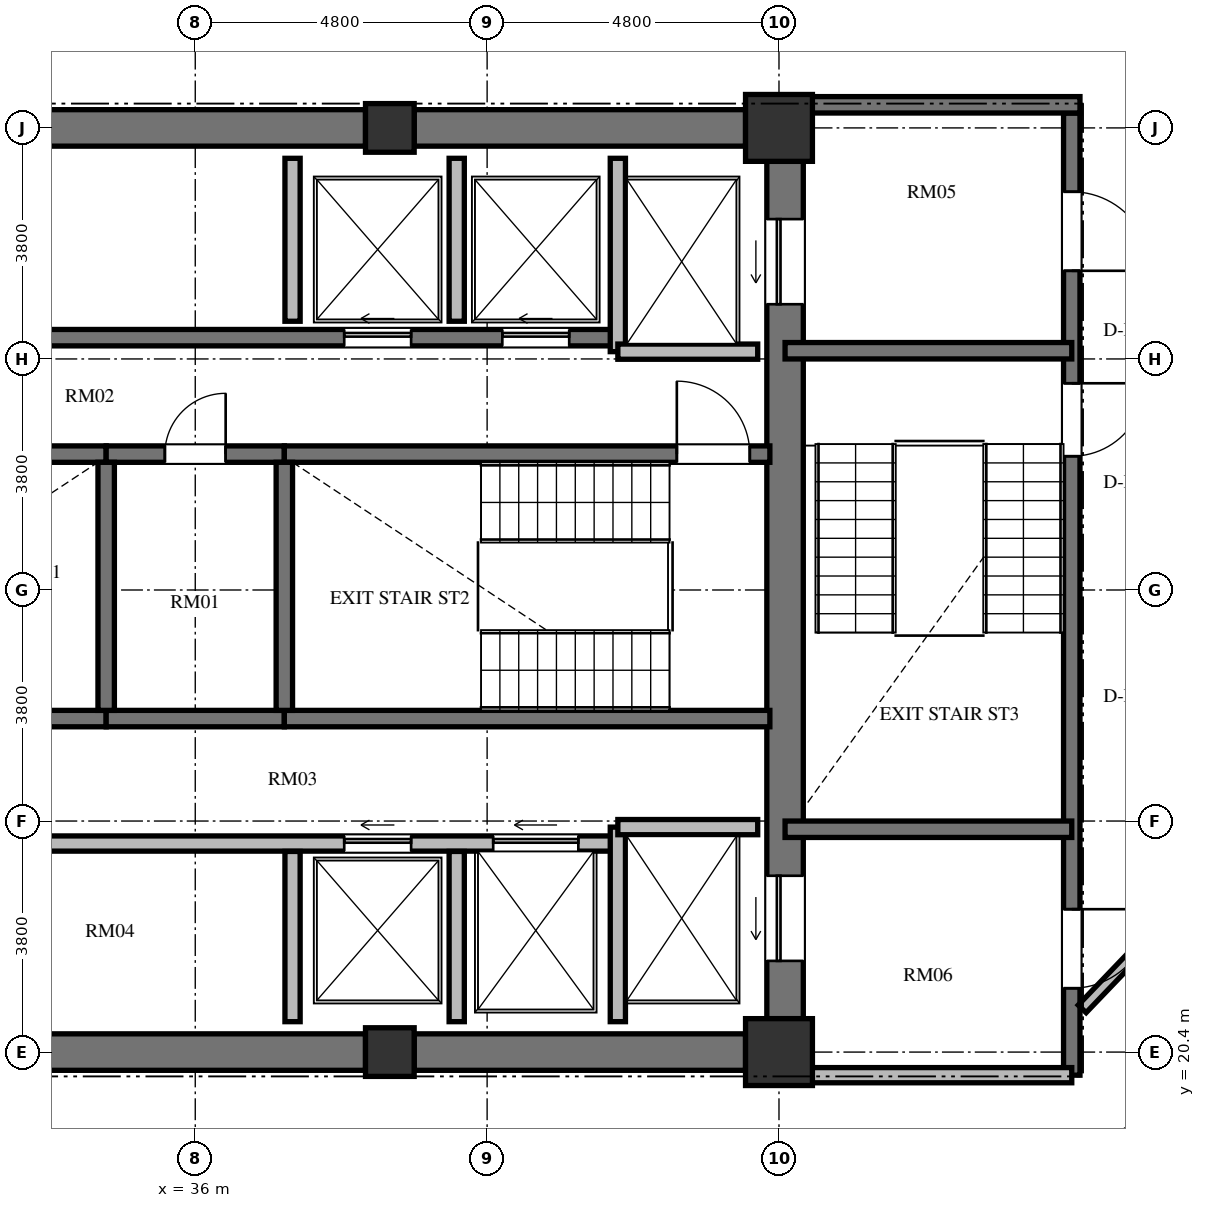
"""IFC4 building model, lengths in metres.
Left out: names, types, materials, properties, quantities, classifications, styles, units other than length and angle.
Written with IfcOpenShell. Run it as: python <this file> out.ifc"""

import sys

from ifc_helpers import new_model, si_unit, direction, frame, frame_2d, origin, origin_2d, place, context, subcontext, project, spatial, rectangle, extrude, element, fill, save


model = new_model("IFC4")
c1 = context("Model", 3, precision=1e-05, world=origin(), true_north=direction((0.0, 1.0)))
c2 = subcontext(c1, "Body", "Model", "MODEL_VIEW")
j1 = project(units=[si_unit("LENGTHUNIT", "METRE"), si_unit("PLANEANGLEUNIT", "RADIAN")], contexts=[c1])
p1 = place(None, origin())
s1 = spatial("IfcSite", under=j1, at=p1, CompositionType="ELEMENT")
p2 = place(p1, origin())
s2 = spatial("IfcBuilding", under=s1, at=p2, CompositionType="ELEMENT")
p3 = place(p2, frame((0.0, 0.0, 216.72)))
s3 = spatial("IfcBuildingStorey", under=s2, at=p3, CompositionType="ELEMENT", Elevation=216.72)
p4 = place(p3, frame((39.2, 20.4, 0.0), z_axis=(0.0, 0.0, 1.0), x_axis=(1.0, 0.0, 0.0)))
e1 = element("IfcColumn", 1, at=p4, inside=s3, PredefinedType="COLUMN", context=c2, shape_type="SweptSolid", body=[
    extrude(rectangle(XDim=0.8, YDim=0.8, at=origin_2d()), origin(), (0.0, 0.0, 1.0), 3.648),
])
for number, where, z_axis, x_axis in (
    (2, (45.6, 20.4, 0.0), (0.0, 0.0, 1.0), (1.0, 0.0, 0.0)),
    (3, (45.6, 35.6, 0.0), (0.0, 0.0, 1.0), (1.0, 0.0, 0.0)),
):
    element("IfcColumn", number, at=place(p3, frame(where, z_axis=z_axis, x_axis=x_axis)), inside=s3, PredefinedType="COLUMN", context=c2, shape_type="SweptSolid", body=[
        extrude(rectangle(XDim=1.1, YDim=1.1, at=origin_2d()), origin(), (0.0, 0.0, 1.0), 3.648),
    ])
p5 = place(p3, frame((39.2, 35.6, 0.0), z_axis=(0.0, 0.0, 1.0), x_axis=(1.0, 0.0, 0.0)))
e4 = element("IfcColumn", 4, at=p5, inside=s3, PredefinedType="COLUMN", context=c2, shape_type="SweptSolid", body=[
    extrude(rectangle(XDim=0.8, YDim=0.8, at=origin_2d()), origin(), (0.0, 0.0, 1.0), 3.648),
])
p6 = place(p3, frame((45.7, 20.95, 0.0), z_axis=(0.0, 0.0, 1.0), x_axis=(0.0, 1.0, 0.0)))
e5 = element("IfcWall", 5, at=p6, inside=s3, PredefinedType="SHEAR", context=c2, shape_type="SweptSolid", body=[
    extrude(rectangle(XDim=14.1, YDim=0.6, at=frame_2d((7.05, 0.0))), origin(), (0.0, 0.0, 1.0), 3.648),
])
p7 = place(p6, frame((11.75, 0.0, 0.0)))
e6 = element("IfcOpeningElement", 6, at=p7, cuts=e5, PredefinedType="OPENING", context=c2, shape_type="SweptSolid", body=[
    extrude(rectangle(XDim=1.4, YDim=2.3, at=frame_2d((0.7, 1.15))), frame((0.0, 0.31, 0.0), z_axis=(0.0, -1.0, 0.0), x_axis=(1.0, 0.0, 0.0)), (0.0, 0.0, 1.0), 0.62),
])
p8 = place(p6, frame((0.95, 0.0, 0.0)))
e7 = element("IfcOpeningElement", 7, at=p8, cuts=e5, PredefinedType="OPENING", context=c2, shape_type="SweptSolid", body=[
    extrude(rectangle(XDim=1.4, YDim=2.3, at=frame_2d((0.7, 1.15))), frame((0.0, 0.31, 0.0), z_axis=(0.0, -1.0, 0.0), x_axis=(1.0, 0.0, 0.0)), (0.0, 0.0, 1.0), 0.62),
])
for number, where, z_axis, x_axis in (
    (8, (33.2, 20.4, 0.0), (0.0, 0.0, 1.0), (1.0, 0.0, 0.0)),
    (9, (33.2, 35.6, 0.0), (0.0, 0.0, 1.0), (1.0, 0.0, 0.0)),
):
    element("IfcWall", number, at=place(p3, frame(where, z_axis=z_axis, x_axis=x_axis)), inside=s3, PredefinedType="SHEAR", context=c2, shape_type="SweptSolid", body=[
        extrude(rectangle(XDim=5.6, YDim=0.6, at=frame_2d((2.8, 0.0))), origin(), (0.0, 0.0, 1.0), 3.648),
    ])
for number, where, z_axis, x_axis in (
    (10, (39.6, 20.4, 0.0), (0.0, 0.0, 1.0), (1.0, 0.0, 0.0)),
    (11, (39.6, 35.6, 0.0), (0.0, 0.0, 1.0), (1.0, 0.0, 0.0)),
):
    element("IfcWall", number, at=place(p3, frame(where, z_axis=z_axis, x_axis=x_axis)), inside=s3, PredefinedType="SHEAR", context=c2, shape_type="SweptSolid", body=[
        extrude(rectangle(XDim=5.45, YDim=0.6, at=frame_2d((2.725, 0.0))), origin(), (0.0, 0.0, 1.0), 3.648),
    ])
p9 = place(p3, frame((26.55, 30.235, 0.0), z_axis=(0.0, 0.0, 1.0), x_axis=(1.0, 0.0, 0.0)))
e12 = element("IfcWall", 12, at=p9, inside=s3, PredefinedType="SHEAR", context=c2, shape_type="SweptSolid", body=[
    extrude(rectangle(XDim=7.985, YDim=0.27, at=frame_2d((3.992, 0.0))), origin(), (0.0, 0.0, 1.0), 3.648),
])
p10 = place(p3, frame((34.535, 30.235, 0.0), z_axis=(0.0, 0.0, 1.0), x_axis=(1.0, 0.0, 0.0)))
e13 = element("IfcWall", 13, at=p10, inside=s3, PredefinedType="SHEAR", context=c2, shape_type="SweptSolid", body=[
    extrude(rectangle(XDim=2.93, YDim=0.27, at=frame_2d((1.465, 0.0))), origin(), (0.0, 0.0, 1.0), 3.648),
])
p11 = place(p10, frame((0.965, 0.0, 0.0)))
e14 = element("IfcOpeningElement", 14, at=p11, cuts=e13, PredefinedType="OPENING", context=c2, shape_type="SweptSolid", body=[
    extrude(rectangle(XDim=1.0, YDim=2.1, at=frame_2d((0.5, 1.05))), frame((0.0, 0.145, 0.0), z_axis=(0.0, -1.0, 0.0), x_axis=(1.0, 0.0, 0.0)), (0.0, 0.0, 1.0), 0.29),
])
p12 = place(p3, frame((37.465, 30.235, 0.0), z_axis=(0.0, 0.0, 1.0), x_axis=(1.0, 0.0, 0.0)))
e15 = element("IfcWall", 15, at=p12, inside=s3, PredefinedType="SHEAR", context=c2, shape_type="SweptSolid", body=[
    extrude(rectangle(XDim=7.985, YDim=0.27, at=frame_2d((3.992, 0.0))), origin(), (0.0, 0.0, 1.0), 3.648),
])
p13 = place(p12, frame((6.455, 0.0, 0.0)))
e16 = element("IfcOpeningElement", 16, at=p13, cuts=e15, PredefinedType="OPENING", context=c2, shape_type="SweptSolid", body=[
    extrude(rectangle(XDim=1.2, YDim=2.15, at=frame_2d((0.6, 1.075))), frame((0.0, 0.145, 0.0), z_axis=(0.0, -1.0, 0.0), x_axis=(1.0, 0.0, 0.0)), (0.0, 0.0, 1.0), 0.29),
])
p14 = place(p3, frame((26.55, 25.885, 0.0), z_axis=(0.0, 0.0, 1.0), x_axis=(1.0, 0.0, 0.0)))
e17 = element("IfcWall", 17, at=p14, inside=s3, PredefinedType="SHEAR", context=c2, shape_type="SweptSolid", body=[
    extrude(rectangle(XDim=7.985, YDim=0.27, at=frame_2d((3.992, 0.0))), origin(), (0.0, 0.0, 1.0), 3.648),
])
p15 = place(p3, frame((34.535, 25.885, 0.0), z_axis=(0.0, 0.0, 1.0), x_axis=(1.0, 0.0, 0.0)))
e18 = element("IfcWall", 18, at=p15, inside=s3, PredefinedType="SHEAR", context=c2, shape_type="SweptSolid", body=[
    extrude(rectangle(XDim=2.93, YDim=0.27, at=frame_2d((1.465, 0.0))), origin(), (0.0, 0.0, 1.0), 3.648),
])
p16 = place(p3, frame((37.465, 25.885, 0.0), z_axis=(0.0, 0.0, 1.0), x_axis=(1.0, 0.0, 0.0)))
e19 = element("IfcWall", 19, at=p16, inside=s3, PredefinedType="SHEAR", context=c2, shape_type="SweptSolid", body=[
    extrude(rectangle(XDim=7.985, YDim=0.27, at=frame_2d((3.992, 0.0))), origin(), (0.0, 0.0, 1.0), 3.648),
])
for number, where, z_axis, x_axis in (
    (20, (34.535, 26.02, 0.0), (0.0, 0.0, 1.0), (0.0, 1.0, 0.0)),
    (21, (37.465, 26.02, 0.0), (0.0, 0.0, 1.0), (0.0, 1.0, 0.0)),
):
    element("IfcWall", number, at=place(p3, frame(where, z_axis=z_axis, x_axis=x_axis)), inside=s3, PredefinedType="SHEAR", context=c2, shape_type="SweptSolid", body=[
        extrude(rectangle(XDim=4.08, YDim=0.27, at=frame_2d((2.04, 0.0))), origin(), (0.0, 0.0, 1.0), 3.648),
    ])
p17 = place(p3, frame((26.55, 32.15, 0.0), z_axis=(0.0, 0.0, 1.0), x_axis=(1.0, 0.0, 0.0)))
e22 = element("IfcWall", 22, at=p17, inside=s3, PredefinedType="SHEAR", context=c2, shape_type="SweptSolid", body=[
    extrude(rectangle(XDim=16.4, YDim=0.27, at=frame_2d((8.2, 0.0))), origin(), (0.0, 0.0, 1.0), 3.648),
])
p18 = place(p17, frame((5.125, 0.0, 0.0)))
e23 = element("IfcOpeningElement", 23, at=p18, cuts=e22, PredefinedType="OPENING", context=c2, shape_type="SweptSolid", body=[
    extrude(rectangle(XDim=1.05, YDim=2.15, at=frame_2d((0.525, 1.075))), frame((0.0, 0.145, 0.0), z_axis=(0.0, -1.0, 0.0), x_axis=(1.0, 0.0, 0.0)), (0.0, 0.0, 1.0), 0.29),
])
p19 = place(p17, frame((11.9, 0.0, 0.0)))
e24 = element("IfcOpeningElement", 24, at=p19, cuts=e22, PredefinedType="OPENING", context=c2, shape_type="SweptSolid", body=[
    extrude(rectangle(XDim=1.1, YDim=2.2, at=frame_2d((0.55, 1.1))), frame((0.0, 0.145, 0.0), z_axis=(0.0, -1.0, 0.0), x_axis=(1.0, 0.0, 0.0)), (0.0, 0.0, 1.0), 0.29),
])
p20 = place(p17, frame((14.5, 0.0, 0.0)))
e25 = element("IfcOpeningElement", 25, at=p20, cuts=e22, PredefinedType="OPENING", context=c2, shape_type="SweptSolid", body=[
    extrude(rectangle(XDim=1.1, YDim=2.2, at=frame_2d((0.55, 1.1))), frame((0.0, 0.145, 0.0), z_axis=(0.0, -1.0, 0.0), x_axis=(1.0, 0.0, 0.0)), (0.0, 0.0, 1.0), 0.29),
])
p21 = place(p3, frame((26.75, 23.83, 0.0), z_axis=(0.0, 0.0, 1.0), x_axis=(1.0, 0.0, 0.0)))
e26 = element("IfcWall", 26, at=p21, inside=s3, PredefinedType="SOLIDWALL", context=c2, shape_type="SweptSolid", body=[
    extrude(rectangle(XDim=16.2, YDim=0.25, at=frame_2d((8.1, 0.0))), origin(), (0.0, 0.0, 1.0), 3.448),
])
p22 = place(p21, frame((4.75, 0.0, 0.0)))
e27 = element("IfcOpeningElement", 27, at=p22, cuts=e26, PredefinedType="OPENING", context=c2, shape_type="SweptSolid", body=[
    extrude(rectangle(XDim=1.4, YDim=2.2, at=frame_2d((0.7, 1.1))), frame((0.0, 0.135, 0.0), z_axis=(0.0, -1.0, 0.0), x_axis=(1.0, 0.0, 0.0)), (0.0, 0.0, 1.0), 0.27),
])
p23 = place(p21, frame((11.7, 0.0, 0.0)))
e28 = element("IfcOpeningElement", 28, at=p23, cuts=e26, PredefinedType="OPENING", context=c2, shape_type="SweptSolid", body=[
    extrude(rectangle(XDim=1.1, YDim=2.2, at=frame_2d((0.55, 1.1))), frame((0.0, 0.135, 0.0), z_axis=(0.0, -1.0, 0.0), x_axis=(1.0, 0.0, 0.0)), (0.0, 0.0, 1.0), 0.27),
])
p24 = place(p21, frame((14.15, 0.0, 0.0)))
e29 = element("IfcOpeningElement", 29, at=p24, cuts=e26, PredefinedType="OPENING", context=c2, shape_type="SweptSolid", body=[
    extrude(rectangle(XDim=1.4, YDim=2.3, at=frame_2d((0.7, 1.15))), frame((0.0, 0.135, 0.0), z_axis=(0.0, -1.0, 0.0), x_axis=(1.0, 0.0, 0.0)), (0.0, 0.0, 1.0), 0.27),
])
p25 = place(p3, frame((42.95, 31.92, 0.0), z_axis=(0.0, 0.0, 1.0), x_axis=(0.0, 1.0, 0.0)))
e30 = element("IfcWall", 30, at=p25, inside=s3, PredefinedType="SOLIDWALL", context=c2, shape_type="SweptSolid", body=[
    extrude(rectangle(XDim=3.18, YDim=0.25, at=frame_2d((1.59, 0.0))), origin(), (0.0, 0.0, 1.0), 3.448),
])
p26 = place(p3, frame((42.95, 31.92, 0.0), z_axis=(0.0, 0.0, 1.0), x_axis=(1.0, 0.0, 0.0)))
e31 = element("IfcWall", 31, at=p26, inside=s3, PredefinedType="SOLIDWALL", context=c2, shape_type="SweptSolid", body=[
    extrude(rectangle(XDim=2.3, YDim=0.25, at=frame_2d((1.15, 0.0))), origin(), (0.0, 0.0, 1.0), 3.448),
])
p27 = place(p3, frame((42.95, 20.9, 0.0), z_axis=(0.0, 0.0, 1.0), x_axis=(0.0, 1.0, 0.0)))
e32 = element("IfcWall", 32, at=p27, inside=s3, PredefinedType="SOLIDWALL", context=c2, shape_type="SweptSolid", body=[
    extrude(rectangle(XDim=3.2, YDim=0.25, at=frame_2d((1.6, 0.0))), origin(), (0.0, 0.0, 1.0), 3.448),
])
p28 = place(p3, frame((42.95, 24.1, 0.0), z_axis=(0.0, 0.0, 1.0), x_axis=(1.0, 0.0, 0.0)))
e33 = element("IfcWall", 33, at=p28, inside=s3, PredefinedType="SOLIDWALL", context=c2, shape_type="SweptSolid", body=[
    extrude(rectangle(XDim=2.3, YDim=0.25, at=frame_2d((1.15, 0.0))), origin(), (0.0, 0.0, 1.0), 3.448),
])
p29 = place(p3, frame((37.6, 32.42, 0.0), z_axis=(0.0, 0.0, 1.0), x_axis=(0.0, 1.0, 0.0)))
e34 = element("IfcWall", 34, at=p29, inside=s3, PredefinedType="SOLIDWALL", context=c2, shape_type="SweptSolid", body=[
    extrude(rectangle(XDim=2.68, YDim=0.25, at=frame_2d((1.34, 0.0))), origin(), (0.0, 0.0, 1.0), 3.448),
])
p30 = place(p3, frame((37.6, 20.9, 0.0), z_axis=(0.0, 0.0, 1.0), x_axis=(0.0, 1.0, 0.0)))
e35 = element("IfcWall", 35, at=p30, inside=s3, PredefinedType="SOLIDWALL", context=c2, shape_type="SweptSolid", body=[
    extrude(rectangle(XDim=2.8, YDim=0.25, at=frame_2d((1.4, 0.0))), origin(), (0.0, 0.0, 1.0), 3.448),
])
p31 = place(p3, frame((40.3, 32.42, 0.0), z_axis=(0.0, 0.0, 1.0), x_axis=(0.0, 1.0, 0.0)))
e36 = element("IfcWall", 36, at=p31, inside=s3, PredefinedType="SOLIDWALL", context=c2, shape_type="SweptSolid", body=[
    extrude(rectangle(XDim=2.68, YDim=0.25, at=frame_2d((1.34, 0.0))), origin(), (0.0, 0.0, 1.0), 3.448),
])
p32 = place(p3, frame((40.3, 20.9, 0.0), z_axis=(0.0, 0.0, 1.0), x_axis=(0.0, 1.0, 0.0)))
e37 = element("IfcWall", 37, at=p32, inside=s3, PredefinedType="SOLIDWALL", context=c2, shape_type="SweptSolid", body=[
    extrude(rectangle(XDim=2.8, YDim=0.25, at=frame_2d((1.4, 0.0))), origin(), (0.0, 0.0, 1.0), 3.448),
])
p33 = place(p3, frame((50.415, 35.845, 0.0), z_axis=(0.0, 0.0, 1.0), x_axis=(0.0, -1.0, 0.0)))
e38 = element("IfcWall", 38, at=p33, inside=s3, PredefinedType="SHEAR", context=c2, shape_type="SweptSolid", body=[
    extrude(rectangle(XDim=15.825, YDim=0.27, at=frame_2d((7.913, 0.0))), origin(), (0.0, 0.0, 1.0), 3.648),
])
p34 = place(p33, frame((4.445, 0.0, 0.0)))
e39 = element("IfcOpeningElement", 39, at=p34, cuts=e38, PredefinedType="OPENING", context=c2, shape_type="SweptSolid", body=[
    extrude(rectangle(XDim=1.2, YDim=2.15, at=frame_2d((0.6, 1.075))), frame((0.0, 0.145, 0.0), z_axis=(0.0, -1.0, 0.0), x_axis=(1.0, 0.0, 0.0)), (0.0, 0.0, 1.0), 0.29),
])
p35 = place(p33, frame((1.295, 0.0, 0.0)))
e40 = element("IfcOpeningElement", 40, at=p35, cuts=e38, PredefinedType="OPENING", context=c2, shape_type="SweptSolid", body=[
    extrude(rectangle(XDim=1.3, YDim=2.2, at=frame_2d((0.65, 1.1))), frame((0.0, 0.145, 0.0), z_axis=(0.0, -1.0, 0.0), x_axis=(1.0, 0.0, 0.0)), (0.0, 0.0, 1.0), 0.29),
])
p36 = place(p33, frame((13.095, 0.0, 0.0)))
e41 = element("IfcOpeningElement", 41, at=p36, cuts=e38, PredefinedType="OPENING", context=c2, shape_type="SweptSolid", body=[
    extrude(rectangle(XDim=1.3, YDim=2.2, at=frame_2d((0.65, 1.1))), frame((0.0, 0.145, 0.0), z_axis=(0.0, -1.0, 0.0), x_axis=(1.0, 0.0, 0.0)), (0.0, 0.0, 1.0), 0.29),
])
p37 = place(p3, frame((46.0, 35.98, 0.0), z_axis=(0.0, 0.0, 1.0), x_axis=(1.0, 0.0, 0.0)))
e42 = element("IfcWall", 42, at=p37, inside=s3, PredefinedType="SHEAR", context=c2, shape_type="SweptSolid", body=[
    extrude(rectangle(XDim=4.55, YDim=0.27, at=frame_2d((2.275, 0.0))), origin(), (0.0, 0.0, 1.0), 3.648),
])
for number, where, z_axis, x_axis in (
    (43, (45.7, 31.935, 0.0), (0.0, 0.0, 1.0), (1.0, 0.0, 0.0)),
    (44, (45.7, 24.065, 0.0), (0.0, 0.0, 1.0), (1.0, 0.0, 0.0)),
):
    element("IfcWall", number, at=place(p3, frame(where, z_axis=z_axis, x_axis=x_axis)), inside=s3, PredefinedType="SHEAR", context=c2, shape_type="SweptSolid", body=[
        extrude(rectangle(XDim=4.715, YDim=0.27, at=frame_2d((2.357, 0.0))), origin(), (0.0, 0.0, 1.0), 3.648),
    ])
p38 = place(p3, frame((45.7, 20.02, 0.0), z_axis=(0.0, 0.0, 1.0), x_axis=(1.0, 0.0, 0.0)))
e45 = element("IfcWall", 45, at=p38, inside=s3, PredefinedType="SOLIDWALL", context=c2, shape_type="SweptSolid", body=[
    extrude(rectangle(XDim=4.715, YDim=0.25, at=frame_2d((2.357, 0.0))), origin(), (0.0, 0.0, 1.0), 3.448),
])
p39 = place(p3, frame((53.078, 23.714, 0.0), z_axis=(0.0, 0.0, 1.0), x_axis=(-0.691353379446, -0.722516785085, 0.0)))
e46 = element("IfcWall", 46, at=p39, inside=s3, PredefinedType="PARTITIONING", context=c2, shape_type="SweptSolid", body=[
    extrude(rectangle(XDim=3.604, YDim=0.18, at=frame_2d((1.802, 0.0))), origin(), (0.0, 0.0, 1.0), 3.448),
])
p40 = place(p13, origin())
e47 = element("IfcDoor", 47, at=p40, inside=s3, OperationType="SINGLE_SWING_LEFT", PredefinedType="DOOR", context=c2, shape_type="SweptSolid", body=[
    extrude(rectangle(XDim=1.2, YDim=2.15, at=frame_2d((0.6, 1.075))), frame((0.0, 0.025, 0.0), z_axis=(0.0, -1.0, 0.0), x_axis=(1.0, 0.0, 0.0)), (0.0, 0.0, 1.0), 0.05),
])
fill(e16, e47)
p41 = place(p11, origin())
e48 = element("IfcDoor", 48, at=p41, inside=s3, OperationType="SINGLE_SWING_RIGHT", PredefinedType="DOOR", context=c2, shape_type="SweptSolid", body=[
    extrude(rectangle(XDim=1.0, YDim=2.1, at=frame_2d((0.5, 1.05))), frame((0.0, 0.025, 0.0), z_axis=(0.0, -1.0, 0.0), x_axis=(1.0, 0.0, 0.0)), (0.0, 0.0, 1.0), 0.05),
])
fill(e14, e48)
p42 = place(p19, origin())
e49 = element("IfcDoor", 49, at=p42, inside=s3, OperationType="SLIDING_TO_LEFT", PredefinedType="DOOR", context=c2, shape_type="SweptSolid", body=[
    extrude(rectangle(XDim=1.1, YDim=2.2, at=frame_2d((0.55, 1.1))), frame((0.0, 0.025, 0.0), z_axis=(0.0, -1.0, 0.0), x_axis=(1.0, 0.0, 0.0)), (0.0, 0.0, 1.0), 0.05),
])
fill(e24, e49)
p43 = place(p20, origin())
e50 = element("IfcDoor", 50, at=p43, inside=s3, OperationType="SLIDING_TO_LEFT", PredefinedType="DOOR", context=c2, shape_type="SweptSolid", body=[
    extrude(rectangle(XDim=1.1, YDim=2.2, at=frame_2d((0.55, 1.1))), frame((0.0, 0.025, 0.0), z_axis=(0.0, -1.0, 0.0), x_axis=(1.0, 0.0, 0.0)), (0.0, 0.0, 1.0), 0.05),
])
fill(e25, e50)
p44 = place(p23, origin())
e51 = element("IfcDoor", 51, at=p44, inside=s3, OperationType="SLIDING_TO_LEFT", PredefinedType="DOOR", context=c2, shape_type="SweptSolid", body=[
    extrude(rectangle(XDim=1.1, YDim=2.2, at=frame_2d((0.55, 1.1))), frame((0.0, 0.025, 0.0), z_axis=(0.0, -1.0, 0.0), x_axis=(1.0, 0.0, 0.0)), (0.0, 0.0, 1.0), 0.05),
])
fill(e28, e51)
p45 = place(p7, origin())
e52 = element("IfcDoor", 52, at=p45, inside=s3, OperationType="SLIDING_TO_LEFT", PredefinedType="DOOR", context=c2, shape_type="SweptSolid", body=[
    extrude(rectangle(XDim=1.4, YDim=2.3, at=frame_2d((0.7, 1.15))), frame((0.0, 0.025, 0.0), z_axis=(0.0, -1.0, 0.0), x_axis=(1.0, 0.0, 0.0)), (0.0, 0.0, 1.0), 0.05),
])
fill(e6, e52)
p46 = place(p8, origin())
e53 = element("IfcDoor", 53, at=p46, inside=s3, OperationType="SLIDING_TO_LEFT", PredefinedType="DOOR", context=c2, shape_type="SweptSolid", body=[
    extrude(rectangle(XDim=1.4, YDim=2.3, at=frame_2d((0.7, 1.15))), frame((0.0, 0.025, 0.0), z_axis=(0.0, -1.0, 0.0), x_axis=(1.0, 0.0, 0.0)), (0.0, 0.0, 1.0), 0.05),
])
fill(e7, e53)
p47 = place(p24, origin())
e54 = element("IfcDoor", 54, at=p47, inside=s3, OperationType="SLIDING_TO_LEFT", PredefinedType="DOOR", context=c2, shape_type="SweptSolid", body=[
    extrude(rectangle(XDim=1.4, YDim=2.3, at=frame_2d((0.7, 1.15))), frame((0.0, 0.025, 0.0), z_axis=(0.0, -1.0, 0.0), x_axis=(1.0, 0.0, 0.0)), (0.0, 0.0, 1.0), 0.05),
])
fill(e29, e54)
p48 = place(p34, origin())
e55 = element("IfcDoor", 55, at=p48, inside=s3, OperationType="SINGLE_SWING_LEFT", PredefinedType="DOOR", context=c2, shape_type="SweptSolid", body=[
    extrude(rectangle(XDim=1.2, YDim=2.15, at=frame_2d((0.6, 1.075))), frame((0.0, 0.025, 0.0), z_axis=(0.0, -1.0, 0.0), x_axis=(1.0, 0.0, 0.0)), (0.0, 0.0, 1.0), 0.05),
])
fill(e39, e55)
p49 = place(p35, origin())
e56 = element("IfcDoor", 56, at=p49, inside=s3, OperationType="SINGLE_SWING_RIGHT", PredefinedType="DOOR", context=c2, shape_type="SweptSolid", body=[
    extrude(rectangle(XDim=1.3, YDim=2.2, at=frame_2d((0.65, 1.1))), frame((0.0, 0.025, 0.0), z_axis=(0.0, -1.0, 0.0), x_axis=(1.0, 0.0, 0.0)), (0.0, 0.0, 1.0), 0.05),
])
fill(e40, e56)
p50 = place(p36, origin())
e57 = element("IfcDoor", 57, at=p50, inside=s3, OperationType="SINGLE_SWING_LEFT", PredefinedType="DOOR", context=c2, shape_type="SweptSolid", body=[
    extrude(rectangle(XDim=1.3, YDim=2.2, at=frame_2d((0.65, 1.1))), frame((0.0, 0.025, 0.0), z_axis=(0.0, -1.0, 0.0), x_axis=(1.0, 0.0, 0.0)), (0.0, 0.0, 1.0), 0.05),
])
fill(e41, e57)
save(model, sys.argv[1])
